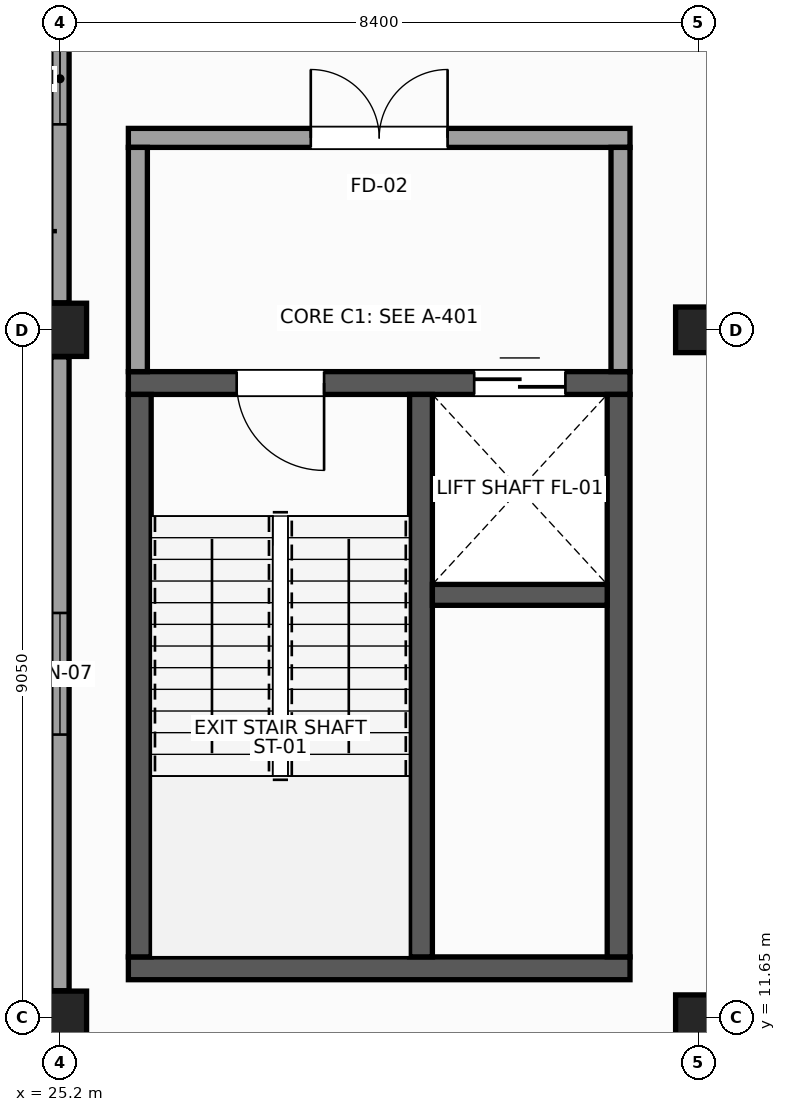
"""IFC4 building model, lengths in metres.
Left out: names, types, materials, properties, quantities, classifications, styles, units other than length and angle.
Written with IfcOpenShell. Run it as: python <this file> out.ifc"""

import sys

from ifc_helpers import new_model, si_unit, direction, frame, frame_2d, origin, origin_2d, place, context, subcontext, project, spatial, rectangle, extrude, element, fill, save


model = new_model("IFC4")
c1 = context("Model", 3, precision=1e-05, world=origin(), true_north=direction((0.0, 1.0)))
c2 = subcontext(c1, "Body", "Model", "MODEL_VIEW")
j1 = project(units=[si_unit("LENGTHUNIT", "METRE"), si_unit("PLANEANGLEUNIT", "RADIAN")], contexts=[c1])
p1 = place(None, origin())
s1 = spatial("IfcSite", under=j1, at=p1, CompositionType="ELEMENT")
p2 = place(p1, origin())
s2 = spatial("IfcBuilding", under=s1, at=p2, CompositionType="ELEMENT")
p3 = place(p2, frame((0.0, 0.0, 15.6)))
s3 = spatial("IfcBuildingStorey", under=s2, at=p3, CompositionType="ELEMENT", Elevation=15.6)
for number, where, z_axis, x_axis in (
    (1, (25.2, 11.65, 0.0), (0.0, 0.0, 1.0), (1.0, 0.0, 0.0)),
    (2, (25.2, 20.7, 0.0), (0.0, 0.0, 1.0), (1.0, 0.0, 0.0)),
):
    element("IfcColumn", number, at=place(p3, frame(where, z_axis=z_axis, x_axis=x_axis)), inside=s3, PredefinedType="COLUMN", context=c2, shape_type="SweptSolid", body=[
        extrude(rectangle(XDim=0.7, YDim=0.7, at=origin_2d()), origin(), (0.0, 0.0, 1.0), 4.5),
    ])
for number, where, z_axis, x_axis in (
    (3, (33.6, 11.65, 0.0), (0.0, 0.0, 1.0), (1.0, 0.0, 0.0)),
    (4, (33.6, 20.7, 0.0), (0.0, 0.0, 1.0), (1.0, 0.0, 0.0)),
):
    element("IfcColumn", number, at=place(p3, frame(where, z_axis=z_axis, x_axis=x_axis)), inside=s3, PredefinedType="COLUMN", context=c2, shape_type="SweptSolid", body=[
        extrude(rectangle(XDim=0.6, YDim=0.6, at=origin_2d()), origin(), (0.0, 0.0, 1.0), 4.5),
    ])
p4 = place(p3, frame((25.2, 26.95, 0.0), z_axis=(0.0, 0.0, 1.0), x_axis=(0.0, -1.0, 0.0)))
e5 = element("IfcWall", 5, at=p4, inside=s3, PredefinedType="STANDARD", context=c2, shape_type="SweptSolid", body=[
    extrude(rectangle(XDim=5.895, YDim=0.24, at=frame_2d((2.948, 0.0))), origin(), (0.0, 0.0, 1.0), 4.2),
])
p5 = place(p4, frame((2.347, 0.0, 0.95)))
e6 = element("IfcOpeningElement", 6, at=p5, cuts=e5, PredefinedType="OPENING", context=c2, shape_type="SweptSolid", body=[
    extrude(rectangle(XDim=1.2, YDim=1.8, at=frame_2d((0.6, 0.9))), frame((0.0, 0.13, 0.0), z_axis=(0.0, -1.0, 0.0), x_axis=(1.0, 0.0, 0.0)), (0.0, 0.0, 1.0), 0.26),
])
p6 = place(p3, frame((25.2, 20.345, 0.0), z_axis=(0.0, 0.0, 1.0), x_axis=(0.0, -1.0, 0.0)))
e7 = element("IfcWall", 7, at=p6, inside=s3, PredefinedType="STANDARD", context=c2, shape_type="SweptSolid", body=[
    extrude(rectangle(XDim=8.34, YDim=0.24, at=frame_2d((4.17, 0.0))), origin(), (0.0, 0.0, 1.0), 3.35),
])
p7 = place(p6, frame((3.37, 0.0, 0.95)))
e8 = element("IfcOpeningElement", 8, at=p7, cuts=e7, PredefinedType="OPENING", context=c2, shape_type="SweptSolid", body=[
    extrude(rectangle(XDim=1.6, YDim=2.2, at=frame_2d((0.8, 1.1))), frame((0.0, 0.13, 0.0), z_axis=(0.0, -1.0, 0.0), x_axis=(1.0, 0.0, 0.0)), (0.0, 0.0, 1.0), 0.26),
])
p8 = place(p3, frame((26.1, 12.3, 0.0), z_axis=(0.0, 0.0, 1.0), x_axis=(1.0, 0.0, 0.0)))
e9 = element("IfcWall", 9, at=p8, inside=s3, PredefinedType="SHEAR", context=c2, shape_type="SweptSolid", body=[
    extrude(rectangle(XDim=6.6, YDim=0.3, at=frame_2d((3.3, 0.0))), origin(), (0.0, 0.0, 1.0), 4.2),
])
p9 = place(p3, frame((26.1, 20.0, 0.0), z_axis=(0.0, 0.0, 1.0), x_axis=(1.0, 0.0, 0.0)))
e10 = element("IfcWall", 10, at=p9, inside=s3, PredefinedType="SHEAR", context=c2, shape_type="SweptSolid", body=[
    extrude(rectangle(XDim=6.6, YDim=0.3, at=frame_2d((3.3, 0.0))), origin(), (0.0, 0.0, 1.0), 4.2),
])
p10 = place(p9, frame((1.425, 0.0, 0.0)))
e11 = element("IfcOpeningElement", 11, at=p10, cuts=e10, PredefinedType="OPENING", context=c2, shape_type="SweptSolid", body=[
    extrude(rectangle(XDim=1.15, YDim=2.2, at=frame_2d((0.575, 1.1))), frame((0.0, 0.16, 0.0), z_axis=(0.0, -1.0, 0.0), x_axis=(1.0, 0.0, 0.0)), (0.0, 0.0, 1.0), 0.32),
])
p11 = place(p9, frame((4.55, 0.0, 0.0)))
e12 = element("IfcOpeningElement", 12, at=p11, cuts=e10, PredefinedType="OPENING", context=c2, shape_type="SweptSolid", body=[
    extrude(rectangle(XDim=1.2, YDim=2.15, at=frame_2d((0.6, 1.075))), frame((0.0, 0.16, 0.0), z_axis=(0.0, -1.0, 0.0), x_axis=(1.0, 0.0, 0.0)), (0.0, 0.0, 1.0), 0.32),
])
for number, where, z_axis, x_axis in (
    (13, (26.25, 12.45, 0.0), (0.0, 0.0, 1.0), (0.0, 1.0, 0.0)),
    (14, (32.55, 12.45, 0.0), (0.0, 0.0, 1.0), (0.0, 1.0, 0.0)),
    (15, (29.95, 12.45, 0.0), (0.0, 0.0, 1.0), (0.0, 1.0, 0.0)),
):
    element("IfcWall", number, at=place(p3, frame(where, z_axis=z_axis, x_axis=x_axis)), inside=s3, PredefinedType="SHEAR", context=c2, shape_type="SweptSolid", body=[
        extrude(rectangle(XDim=7.4, YDim=0.3, at=frame_2d((3.7, 0.0))), origin(), (0.0, 0.0, 1.0), 4.2),
    ])
p12 = place(p3, frame((30.1, 17.213, 0.0), z_axis=(0.0, 0.0, 1.0), x_axis=(1.0, 0.0, 0.0)))
e16 = element("IfcWall", 16, at=p12, inside=s3, PredefinedType="SHEAR", context=c2, shape_type="SweptSolid", body=[
    extrude(rectangle(XDim=2.3, YDim=0.275, at=frame_2d((1.15, 0.0))), origin(), (0.0, 0.0, 1.0), 4.2),
])
p13 = place(p3, frame((26.1, 23.225, 0.0), z_axis=(0.0, 0.0, 1.0), x_axis=(1.0, 0.0, 0.0)))
e17 = element("IfcWall", 17, at=p13, inside=s3, PredefinedType="PARTITIONING", context=c2, shape_type="SweptSolid", body=[
    extrude(rectangle(XDim=6.6, YDim=0.25, at=frame_2d((3.3, 0.0))), origin(), (0.0, 0.0, 1.0), 4.2),
])
p14 = place(p13, frame((2.4, 0.0, 0.0)))
e18 = element("IfcOpeningElement", 18, at=p14, cuts=e17, PredefinedType="OPENING", context=c2, shape_type="SweptSolid", body=[
    extrude(rectangle(XDim=1.8, YDim=2.25, at=frame_2d((0.9, 1.125))), frame((0.0, 0.135, 0.0), z_axis=(0.0, -1.0, 0.0), x_axis=(1.0, 0.0, 0.0)), (0.0, 0.0, 1.0), 0.27),
])
for number, where, z_axis, x_axis in (
    (19, (26.225, 20.15, 0.0), (0.0, 0.0, 1.0), (0.0, 1.0, 0.0)),
    (20, (32.575, 20.15, 0.0), (0.0, 0.0, 1.0), (0.0, 1.0, 0.0)),
):
    element("IfcWall", number, at=place(p3, frame(where, z_axis=z_axis, x_axis=x_axis)), inside=s3, PredefinedType="PARTITIONING", context=c2, shape_type="SweptSolid", body=[
        extrude(rectangle(XDim=2.95, YDim=0.25, at=frame_2d((1.475, 0.0))), origin(), (0.0, 0.0, 1.0), 3.43),
    ])
p15 = place(p5, origin())
e21 = element("IfcWindow", 21, at=p15, inside=s3, PartitioningType="SINGLE_PANEL", PredefinedType="WINDOW", context=c2, shape_type="SweptSolid", body=[
    extrude(rectangle(XDim=1.2, YDim=1.8, at=frame_2d((0.6, 0.9))), frame((0.0, 0.03, 0.0), z_axis=(0.0, -1.0, 0.0), x_axis=(1.0, 0.0, 0.0)), (0.0, 0.0, 1.0), 0.06),
])
fill(e6, e21)
p16 = place(p7, origin())
e22 = element("IfcWindow", 22, at=p16, inside=s3, PartitioningType="SINGLE_PANEL", PredefinedType="WINDOW", context=c2, shape_type="SweptSolid", body=[
    extrude(rectangle(XDim=1.6, YDim=2.2, at=frame_2d((0.8, 1.1))), frame((0.0, 0.03, 0.0), z_axis=(0.0, -1.0, 0.0), x_axis=(1.0, 0.0, 0.0)), (0.0, 0.0, 1.0), 0.06),
])
fill(e8, e22)
p17 = place(p10, frame((1.15, 0.0, 0.0), z_axis=(0.0, 0.0, 1.0), x_axis=(-1.0, 0.0, 0.0)))
e23 = element("IfcDoor", 23, at=p17, inside=s3, OperationType="SINGLE_SWING_LEFT", PredefinedType="DOOR", context=c2, shape_type="SweptSolid", body=[
    extrude(rectangle(XDim=1.15, YDim=2.2, at=frame_2d((0.575, 1.1))), frame((0.0, 0.025, 0.0), z_axis=(0.0, -1.0, 0.0), x_axis=(1.0, 0.0, 0.0)), (0.0, 0.0, 1.0), 0.05),
])
fill(e11, e23)
p18 = place(p11, origin())
e24 = element("IfcDoor", 24, at=p18, inside=s3, OperationType="DOUBLE_DOOR_SLIDING", PredefinedType="DOOR", context=c2, shape_type="SweptSolid", body=[
    extrude(rectangle(XDim=1.2, YDim=2.15, at=frame_2d((0.6, 1.075))), frame((0.0, 0.025, 0.0), z_axis=(0.0, -1.0, 0.0), x_axis=(1.0, 0.0, 0.0)), (0.0, 0.0, 1.0), 0.05),
])
fill(e12, e24)
p19 = place(p14, origin())
e25 = element("IfcDoor", 25, at=p19, inside=s3, OperationType="DOUBLE_DOOR_SINGLE_SWING", PredefinedType="DOOR", context=c2, shape_type="SweptSolid", body=[
    extrude(rectangle(XDim=1.8, YDim=2.25, at=frame_2d((0.9, 1.125))), frame((0.0, 0.025, 0.0), z_axis=(0.0, -1.0, 0.0), x_axis=(1.0, 0.0, 0.0)), (0.0, 0.0, 1.0), 0.05),
])
fill(e18, e25)
save(model, sys.argv[1])
